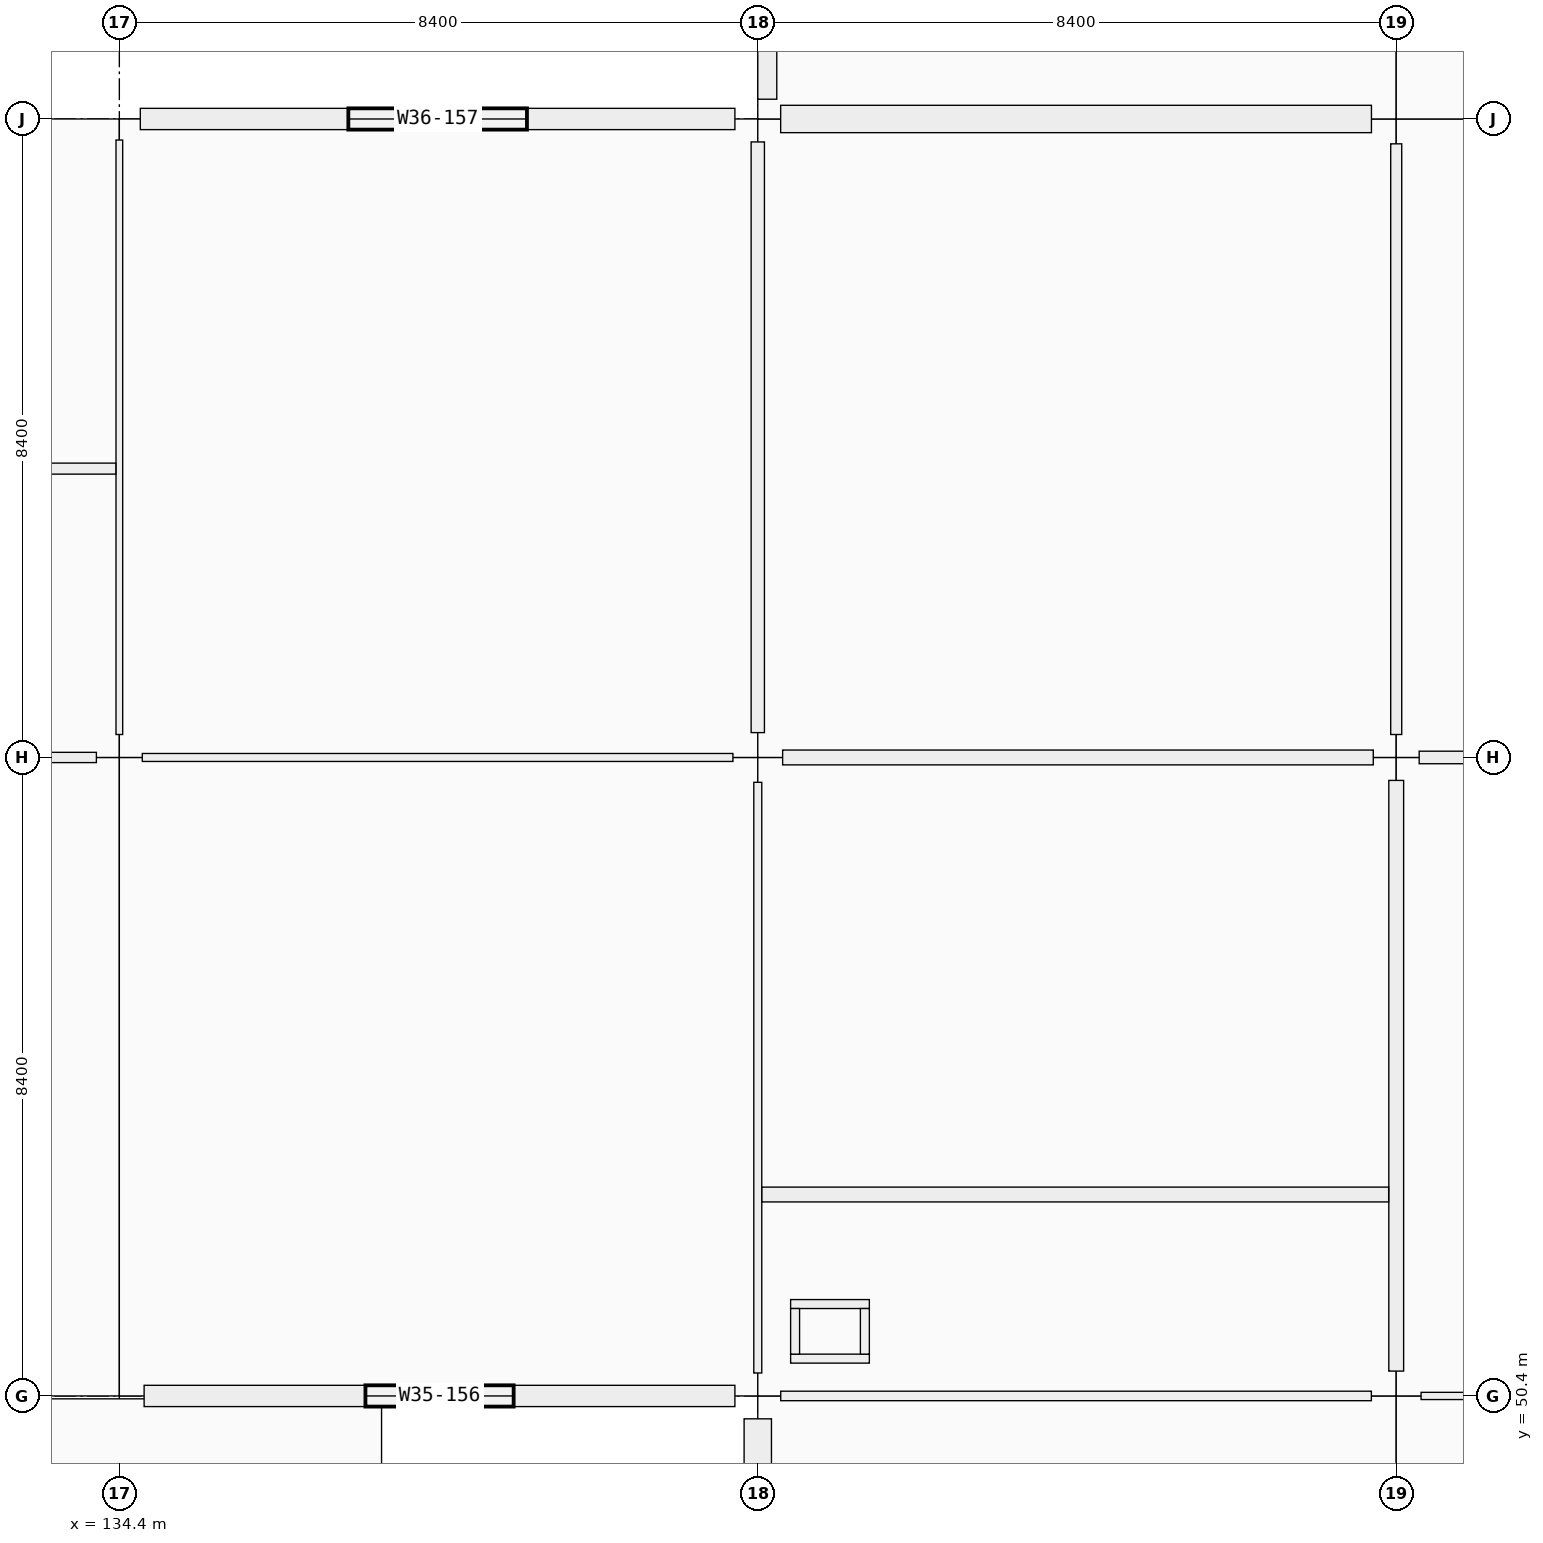
"""IFC4 building model, lengths in metres.
Left out: names, types, materials, properties, quantities, classifications, styles, units other than length and angle.
Written with IfcOpenShell. Run it as: python <this file> out.ifc"""

import sys

from ifc_helpers import new_model, si_unit, direction, frame, frame_2d, origin, origin_2d, place, context, subcontext, project, spatial, rectangle, extrude, element, fill, save


model = new_model("IFC4")
c1 = context("Model", 3, precision=1e-05, world=origin(), true_north=direction((0.0, 1.0)))
c2 = subcontext(c1, "Body", "Model", "MODEL_VIEW")
j1 = project(units=[si_unit("LENGTHUNIT", "METRE"), si_unit("PLANEANGLEUNIT", "RADIAN")], contexts=[c1])
p1 = place(None, origin())
s1 = spatial("IfcSite", under=j1, at=p1, CompositionType="ELEMENT")
p2 = place(p1, origin())
s2 = spatial("IfcBuilding", under=s1, at=p2, CompositionType="ELEMENT")
p3 = place(p2, frame((0.0, 0.0, 10.26)))
s3 = spatial("IfcBuildingStorey", under=s2, at=p3, CompositionType="ELEMENT", Elevation=10.26)
p4 = place(p3, frame((134.4, 50.4, 0.0), z_axis=(0.0, 0.0, 1.0), x_axis=(1.0, 0.0, 0.0)))
e1 = element("IfcColumn", 1, at=p4, inside=s3, PredefinedType="COLUMN", context=c2, shape_type="SweptSolid", body=[
    extrude(rectangle(XDim=0.65, YDim=0.65, at=origin_2d()), origin(), (0.0, 0.0, 1.0), 4.5),
])
p5 = place(p3, frame((134.4, 58.8, 0.0), z_axis=(0.0, 0.0, 1.0), x_axis=(1.0, 0.0, 0.0)))
e2 = element("IfcColumn", 2, at=p5, inside=s3, PredefinedType="COLUMN", context=c2, shape_type="SweptSolid", body=[
    extrude(rectangle(XDim=0.6, YDim=0.6, at=origin_2d()), origin(), (0.0, 0.0, 1.0), 4.5),
])
p6 = place(p3, frame((134.4, 67.2, 0.0), z_axis=(0.0, 0.0, 1.0), x_axis=(1.0, 0.0, 0.0)))
e3 = element("IfcColumn", 3, at=p6, inside=s3, PredefinedType="COLUMN", context=c2, shape_type="SweptSolid", body=[
    extrude(rectangle(XDim=0.55, YDim=0.55, at=origin_2d()), origin(), (0.0, 0.0, 1.0), 4.25),
])
p7 = place(p3, frame((142.8, 50.4, 0.0), z_axis=(0.0, 0.0, 1.0), x_axis=(1.0, 0.0, 0.0)))
e4 = element("IfcColumn", 4, at=p7, inside=s3, PredefinedType="COLUMN", context=c2, shape_type="SweptSolid", body=[
    extrude(rectangle(XDim=0.6, YDim=0.6, at=origin_2d()), origin(), (0.0, 0.0, 1.0), 4.5),
])
p8 = place(p3, frame((142.8, 58.8, 0.0), z_axis=(0.0, 0.0, 1.0), x_axis=(1.0, 0.0, 0.0)))
e5 = element("IfcColumn", 5, at=p8, inside=s3, PredefinedType="COLUMN", context=c2, shape_type="SweptSolid", body=[
    extrude(rectangle(XDim=0.65, YDim=0.65, at=origin_2d()), origin(), (0.0, 0.0, 1.0), 4.5),
])
p9 = place(p3, frame((142.8, 67.2, 0.0), z_axis=(0.0, 0.0, 1.0), x_axis=(1.0, 0.0, 0.0)))
e6 = element("IfcColumn", 6, at=p9, inside=s3, PredefinedType="COLUMN", context=c2, shape_type="SweptSolid", body=[
    extrude(rectangle(XDim=0.6, YDim=0.6, at=origin_2d()), origin(), (0.0, 0.0, 1.0), 4.5),
])
p10 = place(p3, frame((151.2, 50.4, 0.0), z_axis=(0.0, 0.0, 1.0), x_axis=(1.0, 0.0, 0.0)))
e7 = element("IfcColumn", 7, at=p10, inside=s3, PredefinedType="COLUMN", context=c2, shape_type="SweptSolid", body=[
    extrude(rectangle(XDim=0.65, YDim=0.65, at=origin_2d()), origin(), (0.0, 0.0, 1.0), 4.5),
])
p11 = place(p3, frame((151.2, 58.8, 0.0), z_axis=(0.0, 0.0, 1.0), x_axis=(1.0, 0.0, 0.0)))
e8 = element("IfcColumn", 8, at=p11, inside=s3, PredefinedType="COLUMN", context=c2, shape_type="SweptSolid", body=[
    extrude(rectangle(XDim=0.6, YDim=0.6, at=origin_2d()), origin(), (0.0, 0.0, 1.0), 4.5),
])
p12 = place(p3, frame((151.2, 67.2, 0.0), z_axis=(0.0, 0.0, 1.0), x_axis=(1.0, 0.0, 0.0)))
e9 = element("IfcColumn", 9, at=p12, inside=s3, PredefinedType="COLUMN", context=c2, shape_type="SweptSolid", body=[
    extrude(rectangle(XDim=0.65, YDim=0.65, at=origin_2d()), origin(), (0.0, 0.0, 1.0), 4.5),
])
p13 = place(p3, frame((142.499, 50.4, 0.0), z_axis=(0.0, 0.0, 1.0), x_axis=(-1.0, 0.0, 0.0)))
e10 = element("IfcWall", 10, at=p13, inside=s3, PredefinedType="SOLIDWALL", context=c2, shape_type="SweptSolid", body=[
    extrude(rectangle(XDim=7.773, YDim=0.28, at=frame_2d((3.886, 0.0))), origin(), (0.0, 0.0, 1.0), 3.54),
])
p14 = place(p13, frame((2.911, 0.0, 0.9)))
e11 = element("IfcOpeningElement", 11, at=p14, cuts=e10, PredefinedType="OPENING", context=c2, shape_type="SweptSolid", body=[
    extrude(rectangle(XDim=1.95, YDim=1.6, at=frame_2d((0.975, 0.8))), frame((0.0, 0.14, 0.0), z_axis=(0.0, -1.0, 0.0), x_axis=(1.0, 0.0, 0.0)), (0.0, 0.0, 1.0), 0.28),
])
p15 = place(p3, frame((134.676, 67.2, 0.0), z_axis=(0.0, 0.0, 1.0), x_axis=(1.0, 0.0, 0.0)))
e12 = element("IfcWall", 12, at=p15, inside=s3, PredefinedType="SOLIDWALL", context=c2, shape_type="SweptSolid", body=[
    extrude(rectangle(XDim=7.823, YDim=0.28, at=frame_2d((3.912, 0.0))), origin(), (0.0, 0.0, 1.0), 3.54),
])
p16 = place(p15, frame((2.737, 0.0, 0.9)))
e13 = element("IfcOpeningElement", 13, at=p16, cuts=e12, PredefinedType="OPENING", context=c2, shape_type="SweptSolid", body=[
    extrude(rectangle(XDim=2.35, YDim=1.6, at=frame_2d((1.175, 0.8))), frame((0.0, 0.14, 0.0), z_axis=(0.0, -1.0, 0.0), x_axis=(1.0, 0.0, 0.0)), (0.0, 0.0, 1.0), 0.28),
])
p17 = place(p3, frame((142.8, 42.326, 0.0), z_axis=(0.0, 0.0, 1.0), x_axis=(0.0, 1.0, 0.0)))
e14 = element("IfcWall", 14, at=p17, inside=s3, PredefinedType="SOLIDWALL", context=c2, shape_type="SweptSolid", body=[
    extrude(rectangle(XDim=7.773, YDim=0.36, at=frame_2d((3.887, 0.0))), origin(), (0.0, 0.0, 1.0), 3.54),
])
p18 = place(p17, frame((2.837, 0.0, 0.9)))
e15 = element("IfcOpeningElement", 15, at=p18, cuts=e14, PredefinedType="OPENING", context=c2, shape_type="SweptSolid", body=[
    extrude(rectangle(XDim=2.1, YDim=1.8, at=frame_2d((1.05, 0.9))), frame((0.0, 0.18, 0.0), z_axis=(0.0, -1.0, 0.0), x_axis=(1.0, 0.0, 0.0)), (0.0, 0.0, 1.0), 0.36),
])
p19 = place(p3, frame((143.101, 67.2, 0.0), z_axis=(0.0, 0.0, 1.0), x_axis=(1.0, 0.0, 0.0)))
e16 = element("IfcWall", 16, at=p19, inside=s3, PredefinedType="SOLIDWALL", context=c2, shape_type="SweptSolid", body=[
    extrude(rectangle(XDim=7.773, YDim=0.36, at=frame_2d((3.886, 0.0))), origin(), (0.0, 0.0, 1.0), 3.54),
])
p20 = place(p19, frame((2.686, 0.0, 0.9)))
e17 = element("IfcOpeningElement", 17, at=p20, cuts=e16, PredefinedType="OPENING", context=c2, shape_type="SweptSolid", body=[
    extrude(rectangle(XDim=2.4, YDim=1.8, at=frame_2d((1.2, 0.9))), frame((0.0, 0.18, 0.0), z_axis=(0.0, -1.0, 0.0), x_axis=(1.0, 0.0, 0.0)), (0.0, 0.0, 1.0), 0.36),
])
p21 = place(p3, frame((142.925, 67.46, 0.0), z_axis=(0.0, 0.0, 1.0), x_axis=(0.0, 1.0, 0.0)))
e18 = element("IfcWall", 18, at=p21, inside=s3, PredefinedType="PARAPET", context=c2, shape_type="SweptSolid", body=[
    extrude(rectangle(XDim=7.88, YDim=0.25, at=frame_2d((3.94, 0.0))), origin(), (0.0, 0.0, 1.0), 0.95),
])
for number, where, z_axis, x_axis in (
    (19, (143.232, 50.891, 0.0), (0.0, 0.0, 1.0), (1.0, 0.0, 0.0)),
    (20, (143.232, 51.609, 0.0), (0.0, 0.0, 1.0), (1.0, 0.0, 0.0)),
):
    element("IfcWall", number, at=place(p3, frame(where, z_axis=z_axis, x_axis=x_axis)), inside=s3, PredefinedType="PARTITIONING", context=c2, shape_type="SweptSolid", body=[
        extrude(rectangle(XDim=1.036, YDim=0.118, at=frame_2d((0.518, 0.0))), origin(), (0.0, 0.0, 1.0), 3.53),
    ])
for number, where, z_axis, x_axis in (
    (21, (143.291, 50.95, 0.0), (0.0, 0.0, 1.0), (0.0, 1.0, 0.0)),
    (22, (144.209, 50.95, 0.0), (0.0, 0.0, 1.0), (0.0, 1.0, 0.0)),
):
    element("IfcWall", number, at=place(p3, frame(where, z_axis=z_axis, x_axis=x_axis)), inside=s3, PredefinedType="PARTITIONING", context=c2, shape_type="SweptSolid", body=[
        extrude(rectangle(XDim=0.6, YDim=0.118, at=frame_2d((0.3, 0.0))), origin(), (0.0, 0.0, 1.0), 3.53),
    ])
p22 = place(p3, frame((126.327, 58.8, 0.0), z_axis=(0.0, 0.0, 1.0), x_axis=(1.0, 0.0, 0.0)))
e23 = element("IfcWall", 23, at=p22, inside=s3, PredefinedType="PARTITIONING", context=c2, shape_type="SweptSolid", body=[
    extrude(rectangle(XDim=7.771, YDim=0.135, at=frame_2d((3.885, 0.0))), origin(), (0.0, 0.0, 1.0), 3.37),
])
p23 = place(p3, frame((134.702, 58.8, 0.0), z_axis=(0.0, 0.0, 1.0), x_axis=(1.0, 0.0, 0.0)))
e24 = element("IfcWall", 24, at=p23, inside=s3, PredefinedType="PARTITIONING", context=c2, shape_type="SweptSolid", body=[
    extrude(rectangle(XDim=7.771, YDim=0.105, at=frame_2d((3.885, 0.0))), origin(), (0.0, 0.0, 1.0), 3.37),
])
p24 = place(p23, frame((3.415, 0.0, 0.0)))
e25 = element("IfcOpeningElement", 25, at=p24, cuts=e24, PredefinedType="OPENING", context=c2, shape_type="SweptSolid", body=[
    extrude(rectangle(XDim=0.94, YDim=2.15, at=frame_2d((0.47, 1.075))), frame((0.0, 0.052, 0.0), z_axis=(0.0, -1.0, 0.0), x_axis=(1.0, 0.0, 0.0)), (0.0, 0.0, 1.0), 0.105),
])
p25 = place(p3, frame((143.102, 50.4, 0.0), z_axis=(0.0, 0.0, 1.0), x_axis=(1.0, 0.0, 0.0)))
e26 = element("IfcWall", 26, at=p25, inside=s3, PredefinedType="PARTITIONING", context=c2, shape_type="SweptSolid", body=[
    extrude(rectangle(XDim=7.771, YDim=0.125, at=frame_2d((3.885, 0.0))), origin(), (0.0, 0.0, 1.0), 3.37),
])
p26 = place(p3, frame((143.127, 58.8, 0.0), z_axis=(0.0, 0.0, 1.0), x_axis=(1.0, 0.0, 0.0)))
e27 = element("IfcWall", 27, at=p26, inside=s3, PredefinedType="PARTITIONING", context=c2, shape_type="SweptSolid", body=[
    extrude(rectangle(XDim=7.771, YDim=0.195, at=frame_2d((3.885, 0.0))), origin(), (0.0, 0.0, 1.0), 3.37),
])
p27 = place(p3, frame((151.527, 50.4, 0.0), z_axis=(0.0, 0.0, 1.0), x_axis=(1.0, 0.0, 0.0)))
e28 = element("IfcWall", 28, at=p27, inside=s3, PredefinedType="PARTITIONING", context=c2, shape_type="SweptSolid", body=[
    extrude(rectangle(XDim=7.771, YDim=0.095, at=frame_2d((3.885, 0.0))), origin(), (0.0, 0.0, 1.0), 3.37),
])
p28 = place(p27, frame((3.405, 0.0, 0.0)))
e29 = element("IfcOpeningElement", 29, at=p28, cuts=e28, PredefinedType="OPENING", context=c2, shape_type="SweptSolid", body=[
    extrude(rectangle(XDim=0.96, YDim=2.18, at=frame_2d((0.48, 1.09))), frame((0.0, 0.047, 0.0), z_axis=(0.0, -1.0, 0.0), x_axis=(1.0, 0.0, 0.0)), (0.0, 0.0, 1.0), 0.095),
])
p29 = place(p3, frame((151.502, 58.8, 0.0), z_axis=(0.0, 0.0, 1.0), x_axis=(1.0, 0.0, 0.0)))
e30 = element("IfcWall", 30, at=p29, inside=s3, PredefinedType="PARTITIONING", context=c2, shape_type="SweptSolid", body=[
    extrude(rectangle(XDim=7.771, YDim=0.165, at=frame_2d((3.885, 0.0))), origin(), (0.0, 0.0, 1.0), 3.37),
])
p30 = place(p29, frame((3.415, 0.0, 0.0)))
e31 = element("IfcOpeningElement", 31, at=p30, cuts=e30, PredefinedType="OPENING", context=c2, shape_type="SweptSolid", body=[
    extrude(rectangle(XDim=0.94, YDim=2.15, at=frame_2d((0.47, 1.075))), frame((0.0, 0.083, 0.0), z_axis=(0.0, -1.0, 0.0), x_axis=(1.0, 0.0, 0.0)), (0.0, 0.0, 1.0), 0.165),
])
p31 = place(p3, frame((134.4, 59.102, 0.0), z_axis=(0.0, 0.0, 1.0), x_axis=(0.0, 1.0, 0.0)))
e32 = element("IfcWall", 32, at=p31, inside=s3, PredefinedType="PARTITIONING", context=c2, shape_type="SweptSolid", body=[
    extrude(rectangle(XDim=7.821, YDim=0.088, at=frame_2d((3.911, 0.0))), origin(), (0.0, 0.0, 1.0), 3.37),
])
p32 = place(p3, frame((142.8, 50.702, 0.0), z_axis=(0.0, 0.0, 1.0), x_axis=(0.0, 1.0, 0.0)))
e33 = element("IfcWall", 33, at=p32, inside=s3, PredefinedType="PARTITIONING", context=c2, shape_type="SweptSolid", body=[
    extrude(rectangle(XDim=7.771, YDim=0.105, at=frame_2d((3.885, 0.0))), origin(), (0.0, 0.0, 1.0), 3.37),
])
p33 = place(p32, frame((0.673, 0.0, 0.0)))
e34 = element("IfcOpeningElement", 34, at=p33, cuts=e33, PredefinedType="OPENING", context=c2, shape_type="SweptSolid", body=[
    extrude(rectangle(XDim=0.98, YDim=2.08, at=frame_2d((0.49, 1.04))), frame((0.0, 0.052, 0.0), z_axis=(0.0, -1.0, 0.0), x_axis=(1.0, 0.0, 0.0)), (0.0, 0.0, 1.0), 0.105),
])
p34 = place(p32, frame((4.613, 0.0, 0.0)))
e35 = element("IfcOpeningElement", 35, at=p34, cuts=e33, PredefinedType="OPENING", context=c2, shape_type="SweptSolid", body=[
    extrude(rectangle(XDim=0.94, YDim=2.08, at=frame_2d((0.47, 1.04))), frame((0.0, 0.052, 0.0), z_axis=(0.0, -1.0, 0.0), x_axis=(1.0, 0.0, 0.0)), (0.0, 0.0, 1.0), 0.105),
])
p35 = place(p3, frame((142.8, 59.127, 0.0), z_axis=(0.0, 0.0, 1.0), x_axis=(0.0, 1.0, 0.0)))
e36 = element("IfcWall", 36, at=p35, inside=s3, PredefinedType="PARTITIONING", context=c2, shape_type="SweptSolid", body=[
    extrude(rectangle(XDim=7.771, YDim=0.175, at=frame_2d((3.885, 0.0))), origin(), (0.0, 0.0, 1.0), 3.37),
])
p36 = place(p35, frame((3.345, 0.0, 0.0)))
e37 = element("IfcOpeningElement", 37, at=p36, cuts=e36, PredefinedType="OPENING", context=c2, shape_type="SweptSolid", body=[
    extrude(rectangle(XDim=1.08, YDim=2.25, at=frame_2d((0.54, 1.125))), frame((0.0, 0.087, 0.0), z_axis=(0.0, -1.0, 0.0), x_axis=(1.0, 0.0, 0.0)), (0.0, 0.0, 1.0), 0.175),
])
p37 = place(p3, frame((151.2, 50.727, 0.0), z_axis=(0.0, 0.0, 1.0), x_axis=(0.0, 1.0, 0.0)))
e38 = element("IfcWall", 38, at=p37, inside=s3, PredefinedType="PARTITIONING", context=c2, shape_type="SweptSolid", body=[
    extrude(rectangle(XDim=7.771, YDim=0.195, at=frame_2d((3.885, 0.0))), origin(), (0.0, 0.0, 1.0), 3.37),
])
p38 = place(p3, frame((151.2, 59.102, 0.0), z_axis=(0.0, 0.0, 1.0), x_axis=(0.0, 1.0, 0.0)))
e39 = element("IfcWall", 39, at=p38, inside=s3, PredefinedType="PARTITIONING", context=c2, shape_type="SweptSolid", body=[
    extrude(rectangle(XDim=7.771, YDim=0.145, at=frame_2d((3.885, 0.0))), origin(), (0.0, 0.0, 1.0), 3.37),
])
p39 = place(p38, frame((3.401, 0.0, 0.0)))
e40 = element("IfcOpeningElement", 40, at=p39, cuts=e39, PredefinedType="OPENING", context=c2, shape_type="SweptSolid", body=[
    extrude(rectangle(XDim=0.97, YDim=2.12, at=frame_2d((0.485, 1.06))), frame((0.0, 0.073, 0.0), z_axis=(0.0, -1.0, 0.0), x_axis=(1.0, 0.0, 0.0)), (0.0, 0.0, 1.0), 0.145),
])
p40 = place(p3, frame((126.06, 62.6, 0.0), z_axis=(0.0, 0.0, 1.0), x_axis=(1.0, 0.0, 0.0)))
e41 = element("IfcWall", 41, at=p40, inside=s3, PredefinedType="PARTITIONING", context=c2, shape_type="SweptSolid", body=[
    extrude(rectangle(XDim=8.294, YDim=0.145, at=frame_2d((4.147, 0.0))), origin(), (0.0, 0.0, 1.0), 3.37),
])
p41 = place(p3, frame((142.854, 53.05, 0.0), z_axis=(0.0, 0.0, 1.0), x_axis=(1.0, 0.0, 0.0)))
e42 = element("IfcWall", 42, at=p41, inside=s3, PredefinedType="PARTITIONING", context=c2, shape_type="SweptSolid", body=[
    extrude(rectangle(XDim=8.246, YDim=0.195, at=frame_2d((4.123, 0.0))), origin(), (0.0, 0.0, 1.0), 3.37),
])
p42 = place(p14, origin())
e43 = element("IfcWindow", 43, at=p42, inside=s3, PartitioningType="SINGLE_PANEL", PredefinedType="WINDOW", context=c2, shape_type="SweptSolid", body=[
    extrude(rectangle(XDim=1.95, YDim=1.6, at=frame_2d((0.975, 0.8))), frame((0.0, 0.03, 0.0), z_axis=(0.0, -1.0, 0.0), x_axis=(1.0, 0.0, 0.0)), (0.0, 0.0, 1.0), 0.06),
])
fill(e11, e43)
p43 = place(p16, origin())
e44 = element("IfcWindow", 44, at=p43, inside=s3, PartitioningType="SINGLE_PANEL", PredefinedType="WINDOW", context=c2, shape_type="SweptSolid", body=[
    extrude(rectangle(XDim=2.35, YDim=1.6, at=frame_2d((1.175, 0.8))), frame((0.0, 0.03, 0.0), z_axis=(0.0, -1.0, 0.0), x_axis=(1.0, 0.0, 0.0)), (0.0, 0.0, 1.0), 0.06),
])
fill(e13, e44)
p44 = place(p20, origin())
e45 = element("IfcWindow", 45, at=p44, inside=s3, PartitioningType="SINGLE_PANEL", PredefinedType="WINDOW", context=c2, shape_type="SweptSolid", body=[
    extrude(rectangle(XDim=2.4, YDim=1.8, at=frame_2d((1.2, 0.9))), frame((0.0, 0.03, 0.0), z_axis=(0.0, -1.0, 0.0), x_axis=(1.0, 0.0, 0.0)), (0.0, 0.0, 1.0), 0.06),
])
fill(e17, e45)
p45 = place(p33, origin())
e46 = element("IfcDoor", 46, at=p45, inside=s3, OperationType="SINGLE_SWING_RIGHT", PredefinedType="DOOR", context=c2, shape_type="SweptSolid", body=[
    extrude(rectangle(XDim=0.98, YDim=2.08, at=frame_2d((0.49, 1.04))), frame((0.0, 0.025, 0.0), z_axis=(0.0, -1.0, 0.0), x_axis=(1.0, 0.0, 0.0)), (0.0, 0.0, 1.0), 0.05),
])
fill(e34, e46)
p46 = place(p34, origin())
e47 = element("IfcDoor", 47, at=p46, inside=s3, OperationType="SINGLE_SWING_LEFT", PredefinedType="DOOR", context=c2, shape_type="SweptSolid", body=[
    extrude(rectangle(XDim=0.94, YDim=2.08, at=frame_2d((0.47, 1.04))), frame((0.0, 0.025, 0.0), z_axis=(0.0, -1.0, 0.0), x_axis=(1.0, 0.0, 0.0)), (0.0, 0.0, 1.0), 0.05),
])
fill(e35, e47)
p47 = place(p24, origin())
e48 = element("IfcDoor", 48, at=p47, inside=s3, OperationType="SINGLE_SWING_LEFT", PredefinedType="DOOR", context=c2, shape_type="SweptSolid", body=[
    extrude(rectangle(XDim=0.94, YDim=2.15, at=frame_2d((0.47, 1.075))), frame((0.0, 0.025, 0.0), z_axis=(0.0, -1.0, 0.0), x_axis=(1.0, 0.0, 0.0)), (0.0, 0.0, 1.0), 0.05),
])
fill(e25, e48)
p48 = place(p36, origin())
e49 = element("IfcDoor", 49, at=p48, inside=s3, OperationType="SINGLE_SWING_LEFT", PredefinedType="DOOR", context=c2, shape_type="SweptSolid", body=[
    extrude(rectangle(XDim=1.08, YDim=2.25, at=frame_2d((0.54, 1.125))), frame((0.0, 0.025, 0.0), z_axis=(0.0, -1.0, 0.0), x_axis=(1.0, 0.0, 0.0)), (0.0, 0.0, 1.0), 0.05),
])
fill(e37, e49)
p49 = place(p39, origin())
e50 = element("IfcDoor", 50, at=p49, inside=s3, OperationType="SINGLE_SWING_LEFT", PredefinedType="DOOR", context=c2, shape_type="SweptSolid", body=[
    extrude(rectangle(XDim=0.97, YDim=2.12, at=frame_2d((0.485, 1.06))), frame((0.0, 0.025, 0.0), z_axis=(0.0, -1.0, 0.0), x_axis=(1.0, 0.0, 0.0)), (0.0, 0.0, 1.0), 0.05),
])
fill(e40, e50)
save(model, sys.argv[1])
